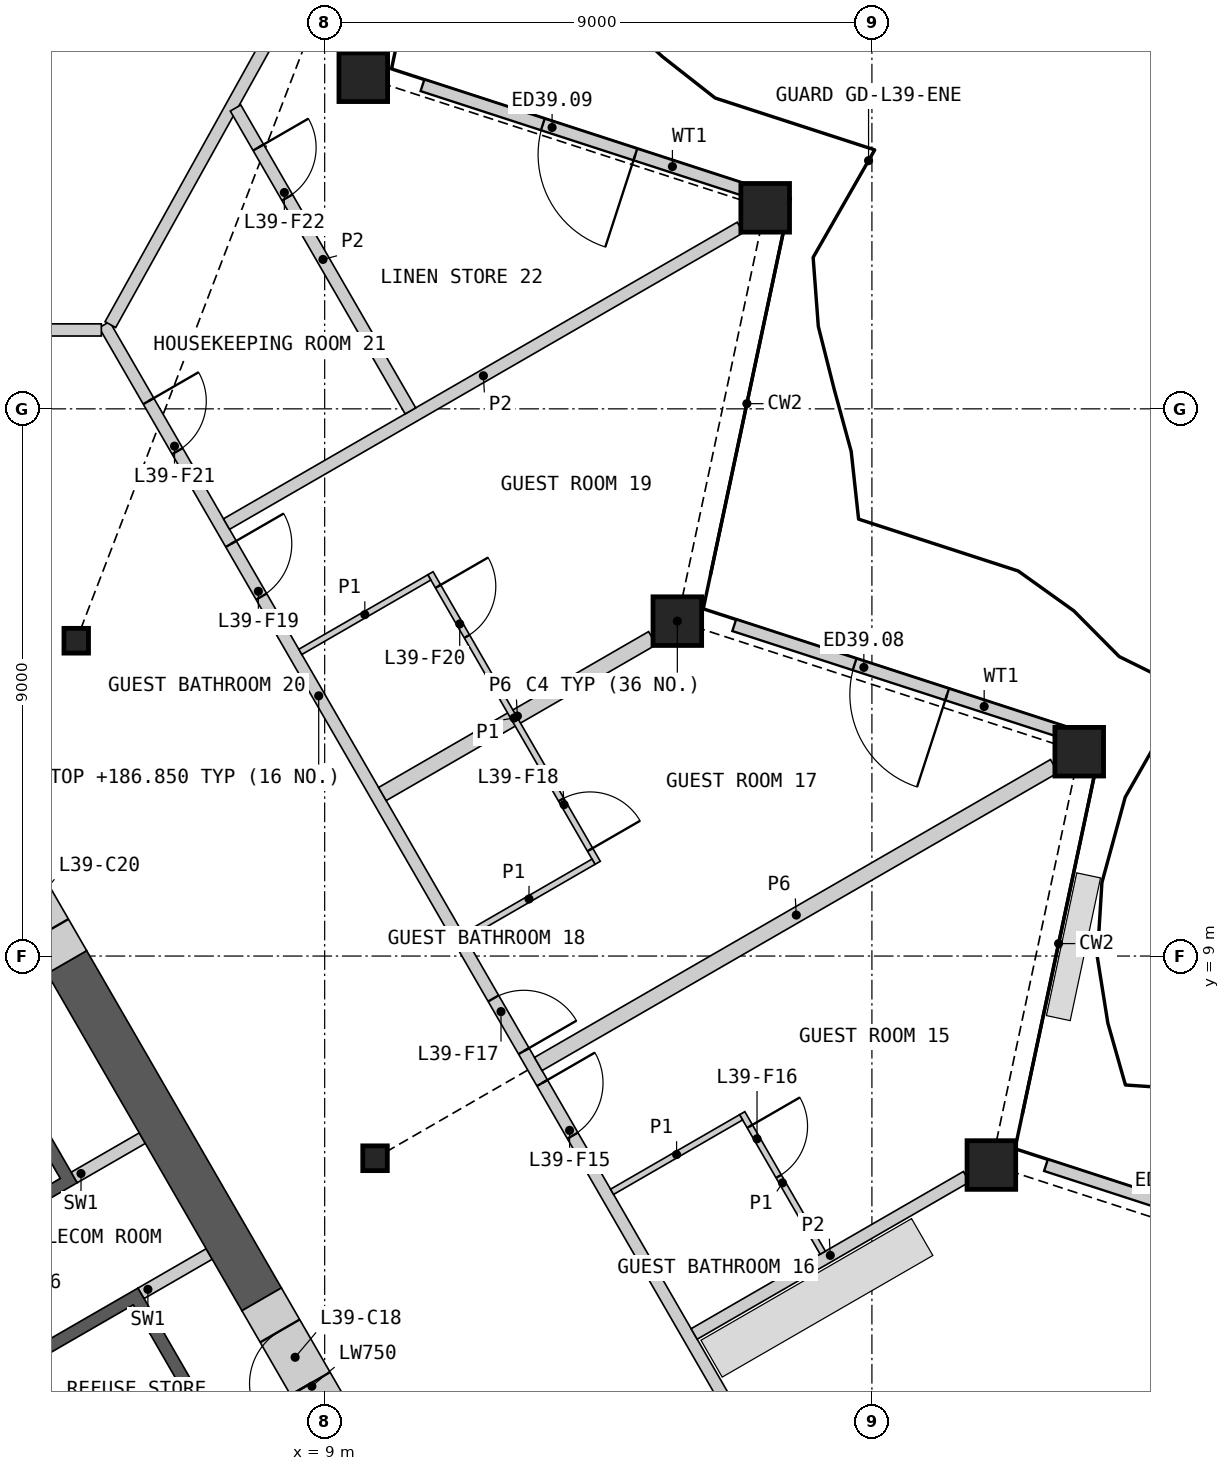
"""IFC4 building model, lengths in metres.
Left out: names, types, materials, properties, quantities, classifications, styles, units other than length and angle.
Written with IfcOpenShell. Run it as: python <this file> out.ifc"""

import sys

from ifc_helpers import new_model, si_unit, direction, frame, frame_2d, origin, origin_2d, place, context, subcontext, project, spatial, polyline, rectangle, hollow_rectangle, i_section, outline, extrude, element, fill, save


model = new_model("IFC4")
c1 = context("Model", 3, precision=1e-05, world=origin(), true_north=direction((0.0, 1.0)))
c2 = subcontext(c1, "Body", "Model", "MODEL_VIEW")
j1 = project(units=[si_unit("LENGTHUNIT", "METRE"), si_unit("PLANEANGLEUNIT", "RADIAN")], contexts=[c1])
p1 = place(None, origin())
s1 = spatial("IfcSite", under=j1, at=p1, CompositionType="ELEMENT")
p2 = place(p1, origin())
s2 = spatial("IfcBuilding", under=s1, at=p2, CompositionType="ELEMENT")
p3 = place(p2, frame((0.0, 0.0, 183.6)))
s3 = spatial("IfcBuildingStorey", under=s2, at=p3, CompositionType="ELEMENT", Elevation=183.6)
for number, where, z_axis, x_axis in (
    (1, (19.965, 5.563, 0.0), (0.0, 0.0, 1.0), (1.0, 0.0, 0.0)),
    (2, (21.409, 12.361, 0.0), (0.0, 0.0, 1.0), (1.0, 0.0, 0.0)),
    (3, (14.8, 14.508, 0.0), (0.0, 0.0, 1.0), (1.0, 0.0, 0.0)),
    (4, (16.245, 21.306, 0.0), (0.0, 0.0, 1.0), (1.0, 0.0, 0.0)),
    (5, (9.635, 23.454, 0.0), (0.0, 0.0, 1.0), (1.0, 0.0, 0.0)),
):
    element("IfcColumn", number, at=place(p3, frame(where, z_axis=z_axis, x_axis=x_axis)), inside=s3, PredefinedType="COLUMN", context=c2, shape_type="SweptSolid", body=[
        extrude(hollow_rectangle(XDim=0.8, YDim=0.8, WallThickness=0.05, at=origin_2d()), origin(), (0.0, 0.0, 1.0), 3.6),
    ])
for number, where, z_axis, x_axis in (
    (6, (9.828, 5.675, 0.0), (0.0, 0.0, 1.0), (1.0, 0.0, 0.0)),
    (7, (4.914, 14.186, 0.0), (0.0, 0.0, 1.0), (1.0, 0.0, 0.0)),
):
    element("IfcColumn", number, at=place(p3, frame(where, z_axis=z_axis, x_axis=x_axis)), inside=s3, PredefinedType="COLUMN", context=c2, shape_type="SweptSolid", body=[
        extrude(i_section(OverallWidth=0.404, OverallDepth=0.407, WebThickness=0.027, FlangeThickness=0.044, at=origin_2d()), origin(), (0.0, 0.0, 1.0), 3.6),
    ])
p4 = place(p3, frame((26.344, 3.779, 0.0), z_axis=(0.0, 0.0, 1.0), x_axis=(-0.951049633358, 0.309038177075, 0.0)))
e8 = element("IfcWall", 8, at=p4, inside=s3, PredefinedType="SOLIDWALL", context=c2, shape_type="SweptSolid", body=[
    extrude(rectangle(XDim=5.763, YDim=0.2, at=frame_2d((2.881, 0.0))), origin(), (0.0, 0.0, 1.0), 2.701),
])
p5 = place(p4, frame((2.082, 0.0, 0.0)))
e9 = element("IfcOpeningElement", 9, at=p5, cuts=e8, PredefinedType="OPENING", context=c2, shape_type="SweptSolid", body=[
    extrude(rectangle(XDim=1.6, YDim=2.4, at=frame_2d((0.8, 1.2))), frame((0.0, 0.11, 0.0), z_axis=(0.0, -1.0, 0.0), x_axis=(1.0, 0.0, 0.0)), (0.0, 0.0, 1.0), 0.22),
])
p6 = place(p3, frame((21.217, 12.659, 0.0), z_axis=(0.0, 0.0, 1.0), x_axis=(-0.951053678976, 0.30902572661, 0.0)))
e10 = element("IfcWall", 10, at=p6, inside=s3, PredefinedType="SOLIDWALL", context=c2, shape_type="SweptSolid", body=[
    extrude(rectangle(XDim=5.763, YDim=0.2, at=frame_2d((2.882, 0.0))), origin(), (0.0, 0.0, 1.0), 2.701),
])
p7 = place(p6, frame((2.082, 0.0, 0.0)))
e11 = element("IfcOpeningElement", 11, at=p7, cuts=e10, PredefinedType="OPENING", context=c2, shape_type="SweptSolid", body=[
    extrude(rectangle(XDim=1.6, YDim=2.4, at=frame_2d((0.8, 1.2))), frame((0.0, 0.11, 0.0), z_axis=(0.0, -1.0, 0.0), x_axis=(1.0, 0.0, 0.0)), (0.0, 0.0, 1.0), 0.22),
])
p8 = place(p3, frame((16.089, 21.54, 0.0), z_axis=(0.0, 0.0, 1.0), x_axis=(-0.951053678976, 0.30902572661, 0.0)))
e12 = element("IfcWall", 12, at=p8, inside=s3, PredefinedType="SOLIDWALL", context=c2, shape_type="SweptSolid", body=[
    extrude(rectangle(XDim=5.763, YDim=0.2, at=frame_2d((2.882, 0.0))), origin(), (0.0, 0.0, 1.0), 2.701),
])
p9 = place(p8, frame((2.082, 0.0, 0.0)))
e13 = element("IfcOpeningElement", 13, at=p9, cuts=e12, PredefinedType="OPENING", context=c2, shape_type="SweptSolid", body=[
    extrude(rectangle(XDim=1.6, YDim=2.4, at=frame_2d((0.8, 1.2))), frame((0.0, 0.11, 0.0), z_axis=(0.0, -1.0, 0.0), x_axis=(1.0, 0.0, 0.0)), (0.0, 0.0, 1.0), 0.22),
])
p10 = place(p3, origin())
e14 = element("IfcWall", 14, at=p10, inside=s3, PredefinedType="SHEAR", context=c2, shape_type="SweptSolid", body=[
    extrude(outline(polyline([(1.561, 6.097), (3.731, 7.35), (4.931, 5.272), (2.76, 4.019), (2.66, 4.192), (4.652, 5.342), (3.652, 7.074), (1.66, 5.924), (1.561, 6.097)])), origin(), (0.0, 0.0, 1.0), 3.25),
])
p11 = place(p3, origin())
e15 = element("IfcWall", 15, at=p11, inside=s3, PredefinedType="SHEAR", context=c2, shape_type="SweptSolid", body=[
    extrude(outline(polyline([(3.76, 2.287), (5.931, 3.54), (8.231, -0.444), (6.061, -1.697), (5.96, -1.524), (7.952, -0.374), (5.852, 3.263), (3.861, 2.113), (3.76, 2.287)])), origin(), (0.0, 0.0, 1.0), 3.25),
])
p12 = place(p3, frame((5.817, -1.476, 0.0), z_axis=(0.0, 0.0, 1.0), x_axis=(-0.500002616675, 0.866023893041, 0.0)))
e16 = element("IfcWall", 16, at=p12, inside=s3, PredefinedType="SOLIDWALL", context=c2, shape_type="SweptSolid", body=[
    extrude(rectangle(XDim=8.373, YDim=0.2, at=frame_2d((4.187, 0.0))), origin(), (0.0, 0.0, 1.0), 3.25),
])
p13 = place(p12, frame((1.537, 0.0, 0.0)))
e17 = element("IfcOpeningElement", 17, at=p13, cuts=e16, PredefinedType="OPENING", context=c2, shape_type="SweptSolid", body=[
    extrude(rectangle(XDim=0.9, YDim=2.1, at=frame_2d((0.45, 1.05))), frame((0.0, 0.11, 0.0), z_axis=(0.0, -1.0, 0.0), x_axis=(1.0, 0.0, 0.0)), (0.0, 0.0, 1.0), 0.22),
])
p14 = place(p12, frame((4.837, 0.0, 0.0)))
e18 = element("IfcOpeningElement", 18, at=p14, cuts=e16, PredefinedType="OPENING", context=c2, shape_type="SweptSolid", body=[
    extrude(rectangle(XDim=0.9, YDim=2.1, at=frame_2d((0.45, 1.05))), frame((0.0, 0.11, 0.0), z_axis=(0.0, -1.0, 0.0), x_axis=(1.0, 0.0, 0.0)), (0.0, 0.0, 1.0), 0.22),
])
p15 = place(p12, frame((6.937, 0.0, 0.0)))
e19 = element("IfcOpeningElement", 19, at=p15, cuts=e16, PredefinedType="OPENING", context=c2, shape_type="SweptSolid", body=[
    extrude(rectangle(XDim=1.1, YDim=2.1, at=frame_2d((0.55, 1.05))), frame((0.0, 0.11, 0.0), z_axis=(0.0, -1.0, 0.0), x_axis=(1.0, 0.0, 0.0)), (0.0, 0.0, 1.0), 0.22),
])
p16 = place(p3, frame((5.981, 3.453, 0.0), z_axis=(0.0, 0.0, 1.0), x_axis=(0.865968639725, 0.500098305348, 0.0)))
e20 = element("IfcWall", 20, at=p16, inside=s3, PredefinedType="SHEAR", context=c2, shape_type="SweptSolid", body=[
    extrude(rectangle(XDim=1.293, YDim=0.2, at=frame_2d((0.646, 0.0))), origin(), (0.0, 0.0, 1.0), 3.25),
])
p17 = place(p3, frame((4.881, 5.358, 0.0), z_axis=(0.0, 0.0, 1.0), x_axis=(0.866084958089, 0.499896834728, 0.0)))
e21 = element("IfcWall", 21, at=p17, inside=s3, PredefinedType="SHEAR", context=c2, shape_type="SweptSolid", body=[
    extrude(rectangle(XDim=1.293, YDim=0.2, at=frame_2d((0.646, 0.0))), origin(), (0.0, 0.0, 1.0), 3.25),
])
p18 = place(p3, frame((7.964, 3.354, 0.0), z_axis=(0.0, 0.0, 1.0), x_axis=(-0.50002928721, 0.866008494146, 0.0)))
e22 = element("IfcWall", 22, at=p18, inside=s3, PredefinedType="SHEAR", context=c2, shape_type="SweptSolid", body=[
    extrude(rectangle(XDim=6.405, YDim=0.75, at=frame_2d((3.203, 0.0))), origin(), (0.0, 0.0, 1.0), 3.25),
])
p19 = place(p3, frame((9.064, 1.448, 0.0), z_axis=(0.0, 0.0, 1.0), x_axis=(-0.50002983664, 0.866008176907, 0.0)))
e23 = element("IfcWall", 23, at=p19, inside=s3, PredefinedType="SHEAR", context=c2, shape_type="SweptSolid", body=[
    extrude(rectangle(XDim=2.2, YDim=0.75, at=frame_2d((1.1, 0.0))), origin(), (0.0, 0.0, 1.0), 3.25),
])
p20 = place(p19, frame((0.6, 0.0, 0.0)))
e24 = element("IfcOpeningElement", 24, at=p20, cuts=e23, PredefinedType="OPENING", context=c2, shape_type="SweptSolid", body=[
    extrude(rectangle(XDim=1.0, YDim=2.1, at=frame_2d((0.5, 1.05))), frame((0.0, 0.385, 0.0), z_axis=(0.0, -1.0, 0.0), x_axis=(1.0, 0.0, 0.0)), (0.0, 0.0, 1.0), 0.77),
])
p21 = place(p3, frame((4.761, 8.901, 0.0), z_axis=(0.0, 0.0, 1.0), x_axis=(-0.499898558967, 0.866083962871, 0.0)))
e25 = element("IfcWall", 25, at=p21, inside=s3, PredefinedType="SHEAR", context=c2, shape_type="SweptSolid", body=[
    extrude(rectangle(XDim=2.2, YDim=0.75, at=frame_2d((1.1, 0.0))), origin(), (0.0, 0.0, 1.0), 3.25),
])
p22 = place(p21, frame((0.6, 0.0, 0.0)))
e26 = element("IfcOpeningElement", 26, at=p22, cuts=e25, PredefinedType="OPENING", context=c2, shape_type="SweptSolid", body=[
    extrude(rectangle(XDim=1.0, YDim=2.1, at=frame_2d((0.5, 1.05))), frame((0.0, 0.385, 0.0), z_axis=(0.0, -1.0, 0.0), x_axis=(1.0, 0.0, 0.0)), (0.0, 0.0, 1.0), 0.77),
])
p23 = place(p3, frame((5.377, 19.385, 0.0), z_axis=(0.0, 0.0, 1.0), x_axis=(0.500000757641, -0.86602496636, 0.0)))
e27 = element("IfcWall", 27, at=p23, inside=s3, PredefinedType="PARTITIONING", context=c2, shape_type="SweptSolid", body=[
    extrude(rectangle(XDim=28.198, YDim=0.2, at=frame_2d((14.099, 0.0))), origin(), (0.0, 0.0, 1.0), 3.25),
])
p24 = place(p23, frame((22.735, 0.0, 0.0)))
e28 = element("IfcOpeningElement", 28, at=p24, cuts=e27, PredefinedType="OPENING", context=c2, shape_type="SweptSolid", body=[
    extrude(rectangle(XDim=1.8, YDim=2.1, at=frame_2d((0.9, 1.05))), frame((0.0, 0.11, 0.0), z_axis=(0.0, -1.0, 0.0), x_axis=(1.0, 0.0, 0.0)), (0.0, 0.0, 1.0), 0.22),
])
p25 = place(p23, frame((14.402, 0.0, 0.0)))
e29 = element("IfcOpeningElement", 29, at=p25, cuts=e27, PredefinedType="OPENING", context=c2, shape_type="SweptSolid", body=[
    extrude(rectangle(XDim=1.0, YDim=2.1, at=frame_2d((0.5, 1.05))), frame((0.0, 0.11, 0.0), z_axis=(0.0, -1.0, 0.0), x_axis=(1.0, 0.0, 0.0)), (0.0, 0.0, 1.0), 0.22),
])
p26 = place(p23, frame((12.796, 0.0, 0.0)))
e30 = element("IfcOpeningElement", 30, at=p26, cuts=e27, PredefinedType="OPENING", context=c2, shape_type="SweptSolid", body=[
    extrude(rectangle(XDim=1.0, YDim=2.1, at=frame_2d((0.5, 1.05))), frame((0.0, 0.11, 0.0), z_axis=(0.0, -1.0, 0.0), x_axis=(1.0, 0.0, 0.0)), (0.0, 0.0, 1.0), 0.22),
])
p27 = place(p23, frame((4.164, 0.0, 0.0)))
e31 = element("IfcOpeningElement", 31, at=p27, cuts=e27, PredefinedType="OPENING", context=c2, shape_type="SweptSolid", body=[
    extrude(rectangle(XDim=1.0, YDim=2.1, at=frame_2d((0.5, 1.05))), frame((0.0, 0.11, 0.0), z_axis=(0.0, -1.0, 0.0), x_axis=(1.0, 0.0, 0.0)), (0.0, 0.0, 1.0), 0.22),
])
p28 = place(p23, frame((1.452, 0.0, 0.0)))
e32 = element("IfcOpeningElement", 32, at=p28, cuts=e27, PredefinedType="OPENING", context=c2, shape_type="SweptSolid", body=[
    extrude(rectangle(XDim=0.95, YDim=2.1, at=frame_2d((0.475, 1.05))), frame((0.0, 0.11, 0.0), z_axis=(0.0, -1.0, 0.0), x_axis=(1.0, 0.0, 0.0)), (0.0, 0.0, 1.0), 0.22),
])
p29 = place(p3, frame((12.513, 7.225, 0.0), z_axis=(0.0, 0.0, 1.0), x_axis=(0.866032905446, 0.499987006516, 0.0)))
e33 = element("IfcWall", 33, at=p29, inside=s3, PredefinedType="PARTITIONING", context=c2, shape_type="SweptSolid", body=[
    extrude(rectangle(XDim=9.799, YDim=0.25, at=frame_2d((4.899, 0.0))), origin(), (0.0, 0.0, 1.0), 2.404),
])
p30 = place(p3, frame((9.95, 11.665, 0.0), z_axis=(0.0, 0.0, 1.0), x_axis=(0.86603095744, 0.499990380663, 0.0)))
e34 = element("IfcWall", 34, at=p30, inside=s3, PredefinedType="PARTITIONING", context=c2, shape_type="SweptSolid", body=[
    extrude(rectangle(XDim=5.127, YDim=0.25, at=frame_2d((2.563, 0.0))), origin(), (0.0, 0.0, 1.0), 2.404),
])
p31 = place(p3, frame((2.325, 19.298, 0.0), z_axis=(0.0, 0.0, 1.0), x_axis=(1.0, 0.0, 0.0)))
e35 = element("IfcWall", 35, at=p31, inside=s3, PredefinedType="PARTITIONING", context=c2, shape_type="SweptSolid", body=[
    extrude(rectangle(XDim=3.002, YDim=0.2, at=frame_2d((1.501, 0.0))), origin(), (0.0, 0.0, 1.0), 3.25),
])
p32 = place(p3, frame((5.476, 19.385, 0.0), z_axis=(0.0, 0.0, 1.0), x_axis=(0.485729569949, 0.874109137853, 0.0)))
e36 = element("IfcWall", 36, at=p32, inside=s3, PredefinedType="PARTITIONING", context=c2, shape_type="SweptSolid", body=[
    extrude(rectangle(XDim=11.962, YDim=0.2, at=frame_2d((5.981, 0.0))), origin(), (0.0, 0.0, 1.0), 2.404),
])
p33 = place(p3, frame((7.386, 16.105, 0.0), z_axis=(0.0, 0.0, 1.0), x_axis=(0.866023056814, 0.500004065051, 0.0)))
e37 = element("IfcWall", 37, at=p33, inside=s3, PredefinedType="PARTITIONING", context=c2, shape_type="SweptSolid", body=[
    extrude(rectangle(XDim=9.756, YDim=0.2, at=frame_2d((4.878, 0.0))), origin(), (0.0, 0.0, 1.0), 2.404),
])
p34 = place(p3, frame((7.534, 22.948, 0.0), z_axis=(0.0, 0.0, 1.0), x_axis=(0.499991885958, -0.866030088378, 0.0)))
e38 = element("IfcWall", 38, at=p34, inside=s3, PredefinedType="PARTITIONING", context=c2, shape_type="SweptSolid", body=[
    extrude(rectangle(XDim=5.752, YDim=0.2, at=frame_2d((2.876, 0.0))), origin(), (0.0, 0.0, 1.0), 2.404),
])
p35 = place(p34, frame((0.75, 0.0, 0.0)))
e39 = element("IfcOpeningElement", 39, at=p35, cuts=e38, PredefinedType="OPENING", context=c2, shape_type="SweptSolid", body=[
    extrude(rectangle(XDim=0.95, YDim=2.1, at=frame_2d((0.475, 1.05))), frame((0.0, 0.11, 0.0), z_axis=(0.0, -1.0, 0.0), x_axis=(1.0, 0.0, 0.0)), (0.0, 0.0, 1.0), 0.22),
])
p36 = place(p3, frame((15.077, 2.784, 0.0), z_axis=(0.0, 0.0, 1.0), x_axis=(0.866020469142, 0.500008546953, 0.0)))
e40 = element("IfcWall", 40, at=p36, inside=s3, PredefinedType="PARTITIONING", context=c2, shape_type="SweptSolid", body=[
    extrude(rectangle(XDim=5.171, YDim=0.2, at=frame_2d((2.585, 0.0))), origin(), (0.0, 0.0, 1.0), 2.404),
])
p37 = place(p3, frame((10.74, 15.296, 0.0), z_axis=(0.0, 0.0, 1.0), x_axis=(0.500015767406, -0.866016300277, 0.0)))
e41 = element("IfcWall", 41, at=p37, inside=s3, PredefinedType="PARTITIONING", context=c2, shape_type="SweptSolid", body=[
    extrude(rectangle(XDim=5.5, YDim=0.1, at=frame_2d((2.75, 0.0))), origin(), (0.0, 0.0, 1.0), 2.404),
])
p38 = place(p37, frame((4.3, 0.0, 0.0)))
e42 = element("IfcOpeningElement", 42, at=p38, cuts=e41, PredefinedType="OPENING", context=c2, shape_type="SweptSolid", body=[
    extrude(rectangle(XDim=0.95, YDim=2.1, at=frame_2d((0.475, 1.05))), frame((0.0, 0.06, 0.0), z_axis=(0.0, -1.0, 0.0), x_axis=(1.0, 0.0, 0.0)), (0.0, 0.0, 1.0), 0.12),
])
p39 = place(p37, frame((0.25, 0.0, 0.0)))
e43 = element("IfcOpeningElement", 43, at=p39, cuts=e41, PredefinedType="OPENING", context=c2, shape_type="SweptSolid", body=[
    extrude(rectangle(XDim=0.95, YDim=2.1, at=frame_2d((0.475, 1.05))), frame((0.0, 0.06, 0.0), z_axis=(0.0, -1.0, 0.0), x_axis=(1.0, 0.0, 0.0)), (0.0, 0.0, 1.0), 0.12),
])
p40 = place(p3, frame((15.867, 6.416, 0.0), z_axis=(0.0, 0.0, 1.0), x_axis=(0.500062700197, -0.865989200783, 0.0)))
e44 = element("IfcWall", 44, at=p40, inside=s3, PredefinedType="PARTITIONING", context=c2, shape_type="SweptSolid", body=[
    extrude(rectangle(XDim=2.65, YDim=0.1, at=frame_2d((1.325, 0.0))), origin(), (0.0, 0.0, 1.0), 2.404),
])
p41 = place(p40, frame((0.25, 0.0, 0.0)))
e45 = element("IfcOpeningElement", 45, at=p41, cuts=e44, PredefinedType="OPENING", context=c2, shape_type="SweptSolid", body=[
    extrude(rectangle(XDim=0.95, YDim=2.1, at=frame_2d((0.475, 1.05))), frame((0.0, 0.06, 0.0), z_axis=(0.0, -1.0, 0.0), x_axis=(1.0, 0.0, 0.0)), (0.0, 0.0, 1.0), 0.12),
])
p42 = place(p3, frame((13.727, 5.123, 0.0), z_axis=(0.0, 0.0, 1.0), x_axis=(0.866032905446, 0.499987006516, 0.0)))
e46 = element("IfcWall", 46, at=p42, inside=s3, PredefinedType="PARTITIONING", context=c2, shape_type="SweptSolid", body=[
    extrude(rectangle(XDim=2.45, YDim=0.1, at=frame_2d((1.225, 0.0))), origin(), (0.0, 0.0, 1.0), 2.404),
])
p43 = place(p3, frame((11.3, 9.326, 0.0), z_axis=(0.0, 0.0, 1.0), x_axis=(0.866014668023, 0.500018594424, 0.0)))
e47 = element("IfcWall", 47, at=p43, inside=s3, PredefinedType="PARTITIONING", context=c2, shape_type="SweptSolid", body=[
    extrude(rectangle(XDim=2.45, YDim=0.1, at=frame_2d((1.225, 0.0))), origin(), (0.0, 0.0, 1.0), 2.404),
])
p44 = place(p3, frame((8.6, 14.003, 0.0), z_axis=(0.0, 0.0, 1.0), x_axis=(0.866032905446, 0.499987006516, 0.0)))
e48 = element("IfcWall", 48, at=p44, inside=s3, PredefinedType="PARTITIONING", context=c2, shape_type="SweptSolid", body=[
    extrude(rectangle(XDim=2.45, YDim=0.1, at=frame_2d((1.225, 0.0))), origin(), (0.0, 0.0, 1.0), 2.404),
])
p45 = place(p7, origin())
e49 = element("IfcDoor", 49, at=p45, inside=s3, OperationType="DOUBLE_DOOR_SINGLE_SWING", PredefinedType="DOOR", context=c2, shape_type="SweptSolid", body=[
    extrude(rectangle(XDim=1.6, YDim=2.4, at=frame_2d((0.8, 1.2))), frame((0.0, 0.025, 0.0), z_axis=(0.0, -1.0, 0.0), x_axis=(1.0, 0.0, 0.0)), (0.0, 0.0, 1.0), 0.05),
])
fill(e11, e49)
p46 = place(p9, origin())
e50 = element("IfcDoor", 50, at=p46, inside=s3, OperationType="DOUBLE_DOOR_SINGLE_SWING", PredefinedType="DOOR", context=c2, shape_type="SweptSolid", body=[
    extrude(rectangle(XDim=1.6, YDim=2.4, at=frame_2d((0.8, 1.2))), frame((0.0, 0.025, 0.0), z_axis=(0.0, -1.0, 0.0), x_axis=(1.0, 0.0, 0.0)), (0.0, 0.0, 1.0), 0.05),
])
fill(e13, e50)
p47 = place(p20, origin())
e51 = element("IfcDoor", 51, at=p47, inside=s3, OperationType="SINGLE_SWING_LEFT", PredefinedType="DOOR", context=c2, shape_type="SweptSolid", body=[
    extrude(rectangle(XDim=1.0, YDim=2.1, at=frame_2d((0.5, 1.05))), frame((0.0, 0.13, 0.0), z_axis=(0.0, -1.0, 0.0), x_axis=(1.0, 0.0, 0.0)), (0.0, 0.0, 1.0), 0.05),
])
fill(e24, e51)
p48 = place(p25, origin())
e52 = element("IfcDoor", 52, at=p48, inside=s3, OperationType="SINGLE_SWING_LEFT", PredefinedType="DOOR", context=c2, shape_type="SweptSolid", body=[
    extrude(rectangle(XDim=1.0, YDim=2.1, at=frame_2d((0.5, 1.05))), frame((0.0, 0.025, 0.0), z_axis=(0.0, -1.0, 0.0), x_axis=(1.0, 0.0, 0.0)), (0.0, 0.0, 1.0), 0.05),
])
fill(e29, e52)
p49 = place(p41, origin())
e53 = element("IfcDoor", 53, at=p49, inside=s3, OperationType="SINGLE_SWING_LEFT", PredefinedType="DOOR", context=c2, shape_type="SweptSolid", body=[
    extrude(rectangle(XDim=0.95, YDim=2.1, at=frame_2d((0.475, 1.05))), frame((0.0, 0.025, 0.0), z_axis=(0.0, -1.0, 0.0), x_axis=(1.0, 0.0, 0.0)), (0.0, 0.0, 1.0), 0.05),
])
fill(e45, e53)
p50 = place(p26, origin())
e54 = element("IfcDoor", 54, at=p50, inside=s3, OperationType="SINGLE_SWING_RIGHT", PredefinedType="DOOR", context=c2, shape_type="SweptSolid", body=[
    extrude(rectangle(XDim=1.0, YDim=2.1, at=frame_2d((0.5, 1.05))), frame((0.0, 0.025, 0.0), z_axis=(0.0, -1.0, 0.0), x_axis=(1.0, 0.0, 0.0)), (0.0, 0.0, 1.0), 0.05),
])
fill(e30, e54)
p51 = place(p38, origin())
e55 = element("IfcDoor", 55, at=p51, inside=s3, OperationType="SINGLE_SWING_RIGHT", PredefinedType="DOOR", context=c2, shape_type="SweptSolid", body=[
    extrude(rectangle(XDim=0.95, YDim=2.1, at=frame_2d((0.475, 1.05))), frame((0.0, 0.025, 0.0), z_axis=(0.0, -1.0, 0.0), x_axis=(1.0, 0.0, 0.0)), (0.0, 0.0, 1.0), 0.05),
])
fill(e42, e55)
p52 = place(p27, origin())
e56 = element("IfcDoor", 56, at=p52, inside=s3, OperationType="SINGLE_SWING_LEFT", PredefinedType="DOOR", context=c2, shape_type="SweptSolid", body=[
    extrude(rectangle(XDim=1.0, YDim=2.1, at=frame_2d((0.5, 1.05))), frame((0.0, 0.025, 0.0), z_axis=(0.0, -1.0, 0.0), x_axis=(1.0, 0.0, 0.0)), (0.0, 0.0, 1.0), 0.05),
])
fill(e31, e56)
p53 = place(p39, origin())
e57 = element("IfcDoor", 57, at=p53, inside=s3, OperationType="SINGLE_SWING_LEFT", PredefinedType="DOOR", context=c2, shape_type="SweptSolid", body=[
    extrude(rectangle(XDim=0.95, YDim=2.1, at=frame_2d((0.475, 1.05))), frame((0.0, 0.025, 0.0), z_axis=(0.0, -1.0, 0.0), x_axis=(1.0, 0.0, 0.0)), (0.0, 0.0, 1.0), 0.05),
])
fill(e43, e57)
p54 = place(p28, origin())
e58 = element("IfcDoor", 58, at=p54, inside=s3, OperationType="SINGLE_SWING_LEFT", PredefinedType="DOOR", context=c2, shape_type="SweptSolid", body=[
    extrude(rectangle(XDim=0.95, YDim=2.1, at=frame_2d((0.475, 1.05))), frame((0.0, 0.025, 0.0), z_axis=(0.0, -1.0, 0.0), x_axis=(1.0, 0.0, 0.0)), (0.0, 0.0, 1.0), 0.05),
])
fill(e32, e58)
p55 = place(p35, origin())
e59 = element("IfcDoor", 59, at=p55, inside=s3, OperationType="SINGLE_SWING_LEFT", PredefinedType="DOOR", context=c2, shape_type="SweptSolid", body=[
    extrude(rectangle(XDim=0.95, YDim=2.1, at=frame_2d((0.475, 1.05))), frame((0.0, 0.025, 0.0), z_axis=(0.0, -1.0, 0.0), x_axis=(1.0, 0.0, 0.0)), (0.0, 0.0, 1.0), 0.05),
])
fill(e39, e59)
save(model, sys.argv[1])
